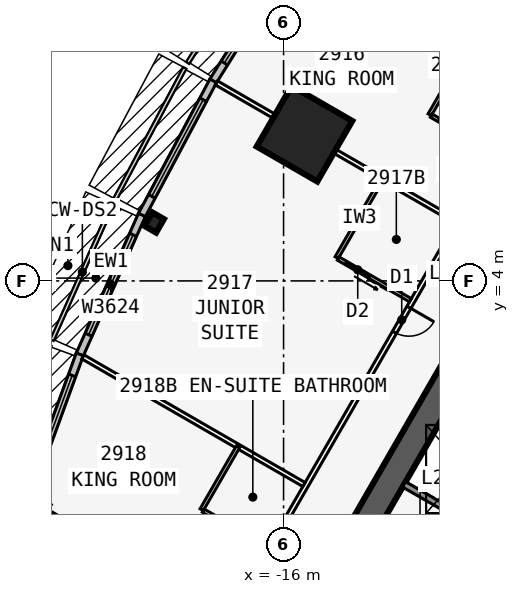
"""IFC4 building model, lengths in metres.
Left out: names, types, materials, properties, quantities, classifications, styles, units other than length and angle.
Written with IfcOpenShell. Run it as: python <this file> out.ifc"""

import sys

from ifc_helpers import new_model, si_unit, direction, frame, frame_2d, origin, origin_2d, place, context, subcontext, project, spatial, rectangle, i_section, extrude, element, fill, save


model = new_model("IFC4")
c1 = context("Model", 3, precision=1e-05, world=origin(), true_north=direction((0.0, 1.0)))
c2 = subcontext(c1, "Body", "Model", "MODEL_VIEW")
j1 = project(units=[si_unit("LENGTHUNIT", "METRE"), si_unit("PLANEANGLEUNIT", "RADIAN")], contexts=[c1])
p1 = place(None, origin())
s1 = spatial("IfcSite", under=j1, at=p1, CompositionType="ELEMENT")
p2 = place(p1, origin())
s2 = spatial("IfcBuilding", under=s1, at=p2, CompositionType="ELEMENT")
p3 = place(p2, frame((0.0, 0.0, 114.7)))
s3 = spatial("IfcBuildingStorey", under=s2, at=p3, CompositionType="ELEMENT", Elevation=114.7)
p4 = place(p3, frame((0.0, 19.052, 0.0), z_axis=(0.0, 0.0, 1.0), x_axis=(-0.499999749417, -0.866025548458, 0.0)))
e1 = element("IfcWall", 1, at=p4, inside=s3, PredefinedType="SHEAR", context=c2, shape_type="SweptSolid", body=[
    extrude(rectangle(XDim=33.0, YDim=0.9, at=frame_2d((16.5, 0.0))), origin(), (0.0, 0.0, 1.0), 3.4),
])
p5 = place(p4, frame((14.15, 0.0, 0.0)))
e2 = element("IfcOpeningElement", 2, at=p5, cuts=e1, PredefinedType="OPENING", context=c2, shape_type="SweptSolid", body=[
    extrude(rectangle(XDim=1.8, YDim=2.13, at=frame_2d((0.9, 1.065))), frame((0.0, 0.46, 0.0), z_axis=(0.0, -1.0, 0.0), x_axis=(1.0, 0.0, 0.0)), (0.0, 0.0, 1.0), 0.92),
])
p6 = place(p4, frame((12.6, 0.0, 0.0)))
e3 = element("IfcOpeningElement", 3, at=p6, cuts=e1, PredefinedType="OPENING", context=c2, shape_type="SweptSolid", body=[
    extrude(rectangle(XDim=1.0, YDim=2.13, at=frame_2d((0.5, 1.065))), frame((0.0, 0.46, 0.0), z_axis=(0.0, -1.0, 0.0), x_axis=(1.0, 0.0, 0.0)), (0.0, 0.0, 1.0), 0.92),
])
p7 = place(p3, frame((-9.329, -4.256, 0.0), z_axis=(0.0, 0.0, 1.0), x_axis=(-0.866022959057, 0.500004234368, 0.0)))
e4 = element("IfcWall", 4, at=p7, inside=s3, PredefinedType="SOLIDWALL", context=c2, shape_type="SweptSolid", body=[
    extrude(rectangle(XDim=3.125, YDim=0.2, at=frame_2d((1.562, 0.0))), origin(), (0.0, 0.0, 1.0), 3.235),
])
p8 = place(p3, frame((-20.254, 5.92, 0.0), z_axis=(0.0, 0.0, 1.0), x_axis=(-0.866025403784, 0.5, 0.0)))
e5 = element("IfcColumn", 5, at=p8, inside=s3, PredefinedType="COLUMN", context=c2, shape_type="SweptSolid", body=[
    extrude(i_section(OverallWidth=0.437, OverallDepth=0.513, WebThickness=0.061, FlangeThickness=0.097, at=origin_2d()), origin(), (0.0, 0.0, 1.0), 3.4),
])
p9 = place(p3, frame((-15.312, 8.84, 0.0), z_axis=(0.0, 0.0, 1.0), x_axis=(-0.866025403784, 0.5, 0.0)))
e6 = element("IfcColumn", 6, at=p9, inside=s3, PredefinedType="COLUMN", context=c2, shape_type="SweptSolid", body=[
    extrude(rectangle(XDim=2.3, YDim=2.3, at=origin_2d()), origin(), (0.0, 0.0, 1.0), 3.4),
])
p10 = place(p3, frame((-15.667, 14.814, 0.0), z_axis=(0.0, 0.0, 1.0), x_axis=(-0.529990167382, -0.84800378683, 0.0)))
e7 = element("IfcWall", 7, at=p10, inside=s3, PredefinedType="STANDARD", context=c2, shape_type="SweptSolid", body=[
    extrude(rectangle(XDim=5.003, YDim=0.25, at=frame_2d((2.501, 0.0))), origin(), (0.0, 0.0, 1.0), 3.235),
])
p11 = place(p10, frame((0.701, 0.0, 0.45)))
e8 = element("IfcOpeningElement", 8, at=p11, cuts=e7, PredefinedType="OPENING", context=c2, shape_type="SweptSolid", body=[
    extrude(rectangle(XDim=3.6, YDim=2.4, at=frame_2d((1.8, 1.2))), frame((0.0, 0.135, 0.0), z_axis=(0.0, -1.0, 0.0), x_axis=(1.0, 0.0, 0.0)), (0.0, 0.0, 1.0), 0.27),
])
p12 = place(p3, frame((-18.314, 10.579, 0.0), z_axis=(0.0, 0.0, 1.0), x_axis=(-0.469404966864, -0.882982999317, 0.0)))
e9 = element("IfcWall", 9, at=p12, inside=s3, PredefinedType="STANDARD", context=c2, shape_type="SweptSolid", body=[
    extrude(rectangle(XDim=5.003, YDim=0.25, at=frame_2d((2.501, 0.0))), origin(), (0.0, 0.0, 1.0), 3.235),
])
p13 = place(p12, frame((0.701, 0.0, 0.45)))
e10 = element("IfcOpeningElement", 10, at=p13, cuts=e9, PredefinedType="OPENING", context=c2, shape_type="SweptSolid", body=[
    extrude(rectangle(XDim=3.6, YDim=2.4, at=frame_2d((1.8, 1.2))), frame((0.0, 0.135, 0.0), z_axis=(0.0, -1.0, 0.0), x_axis=(1.0, 0.0, 0.0)), (0.0, 0.0, 1.0), 0.27),
])
p14 = place(p3, frame((-20.659, 6.169, 0.0), z_axis=(0.0, 0.0, 1.0), x_axis=(-0.406832200364, -0.913502906808, 0.0)))
e11 = element("IfcWall", 11, at=p14, inside=s3, PredefinedType="STANDARD", context=c2, shape_type="SweptSolid", body=[
    extrude(rectangle(XDim=5.028, YDim=0.25, at=frame_2d((2.514, 0.0))), origin(), (0.0, 0.0, 1.0), 3.235),
])
p15 = place(p14, frame((0.714, 0.0, 0.45)))
e12 = element("IfcOpeningElement", 12, at=p15, cuts=e11, PredefinedType="OPENING", context=c2, shape_type="SweptSolid", body=[
    extrude(rectangle(XDim=3.6, YDim=2.4, at=frame_2d((1.8, 1.2))), frame((0.0, 0.135, 0.0), z_axis=(0.0, -1.0, 0.0), x_axis=(1.0, 0.0, 0.0)), (0.0, 0.0, 1.0), 0.27),
])
p16 = place(p3, frame((-22.701, 1.584, 0.0), z_axis=(0.0, 0.0, 1.0), x_axis=(-0.343225593282, -0.939252996863, 0.0)))
e13 = element("IfcWall", 13, at=p16, inside=s3, PredefinedType="STANDARD", context=c2, shape_type="SweptSolid", body=[
    extrude(rectangle(XDim=5.076, YDim=0.25, at=frame_2d((2.538, 0.0))), origin(), (0.0, 0.0, 1.0), 3.235),
])
p17 = place(p16, frame((0.738, 0.0, 0.45)))
e14 = element("IfcOpeningElement", 14, at=p17, cuts=e13, PredefinedType="OPENING", context=c2, shape_type="SweptSolid", body=[
    extrude(rectangle(XDim=3.6, YDim=2.4, at=frame_2d((1.8, 1.2))), frame((0.0, 0.135, 0.0), z_axis=(0.0, -1.0, 0.0), x_axis=(1.0, 0.0, 0.0)), (0.0, 0.0, 1.0), 0.27),
])
p18 = place(p3, frame((-0.5, 22.836, 0.0), z_axis=(0.0, 0.0, 1.0), x_axis=(-0.500001677587, -0.866024435227, 0.0)))
e15 = element("IfcWall", 15, at=p18, inside=s3, PredefinedType="PARTITIONING", context=c2, shape_type="SweptSolid", body=[
    extrude(rectangle(XDim=39.054, YDim=0.15, at=frame_2d((19.527, 0.0))), origin(), (0.0, 0.0, 1.0), 3.235),
])
p19 = place(p18, frame((0.352, 0.0, 0.0)))
e16 = element("IfcOpeningElement", 16, at=p19, cuts=e15, PredefinedType="OPENING", context=c2, shape_type="SweptSolid", body=[
    extrude(rectangle(XDim=0.95, YDim=2.13, at=frame_2d((0.475, 1.065))), frame((0.0, 0.085, 0.0), z_axis=(0.0, -1.0, 0.0), x_axis=(1.0, 0.0, 0.0)), (0.0, 0.0, 1.0), 0.17),
])
p20 = place(p18, frame((7.152, 0.0, 0.0)))
e17 = element("IfcOpeningElement", 17, at=p20, cuts=e15, PredefinedType="OPENING", context=c2, shape_type="SweptSolid", body=[
    extrude(rectangle(XDim=0.95, YDim=2.13, at=frame_2d((0.475, 1.065))), frame((0.0, 0.085, 0.0), z_axis=(0.0, -1.0, 0.0), x_axis=(1.0, 0.0, 0.0)), (0.0, 0.0, 1.0), 0.17),
])
p21 = place(p18, frame((12.152, 0.0, 0.0)))
e18 = element("IfcOpeningElement", 18, at=p21, cuts=e15, PredefinedType="OPENING", context=c2, shape_type="SweptSolid", body=[
    extrude(rectangle(XDim=0.95, YDim=2.13, at=frame_2d((0.475, 1.065))), frame((0.0, 0.085, 0.0), z_axis=(0.0, -1.0, 0.0), x_axis=(1.0, 0.0, 0.0)), (0.0, 0.0, 1.0), 0.17),
])
p22 = place(p18, frame((17.152, 0.0, 0.0)))
e19 = element("IfcOpeningElement", 19, at=p22, cuts=e15, PredefinedType="OPENING", context=c2, shape_type="SweptSolid", body=[
    extrude(rectangle(XDim=0.95, YDim=2.13, at=frame_2d((0.475, 1.065))), frame((0.0, 0.085, 0.0), z_axis=(0.0, -1.0, 0.0), x_axis=(1.0, 0.0, 0.0)), (0.0, 0.0, 1.0), 0.17),
])
p23 = place(p18, frame((22.752, 0.0, 0.0)))
e20 = element("IfcOpeningElement", 20, at=p23, cuts=e15, PredefinedType="OPENING", context=c2, shape_type="SweptSolid", body=[
    extrude(rectangle(XDim=0.95, YDim=2.13, at=frame_2d((0.475, 1.065))), frame((0.0, 0.085, 0.0), z_axis=(0.0, -1.0, 0.0), x_axis=(1.0, 0.0, 0.0)), (0.0, 0.0, 1.0), 0.17),
])
p24 = place(p18, frame((32.152, 0.0, 0.0)))
e21 = element("IfcOpeningElement", 21, at=p24, cuts=e15, PredefinedType="OPENING", context=c2, shape_type="SweptSolid", body=[
    extrude(rectangle(XDim=0.95, YDim=2.13, at=frame_2d((0.475, 1.065))), frame((0.0, 0.085, 0.0), z_axis=(0.0, -1.0, 0.0), x_axis=(1.0, 0.0, 0.0)), (0.0, 0.0, 1.0), 0.17),
])
p25 = place(p18, frame((37.752, 0.0, 0.0)))
e22 = element("IfcOpeningElement", 22, at=p25, cuts=e15, PredefinedType="OPENING", context=c2, shape_type="SweptSolid", body=[
    extrude(rectangle(XDim=0.95, YDim=2.13, at=frame_2d((0.475, 1.065))), frame((0.0, 0.085, 0.0), z_axis=(0.0, -1.0, 0.0), x_axis=(1.0, 0.0, 0.0)), (0.0, 0.0, 1.0), 0.17),
])
p26 = place(p3, frame((-7.829, 10.293, 0.0), z_axis=(0.0, 0.0, 1.0), x_axis=(-0.866027015393, 0.499997208602, 0.0)))
e23 = element("IfcWall", 23, at=p26, inside=s3, PredefinedType="PARTITIONING", context=c2, shape_type="SweptSolid", body=[
    extrude(rectangle(XDim=8.922, YDim=0.15, at=frame_2d((4.461, 0.0))), origin(), (0.0, 0.0, 1.0), 2.389),
])
p27 = place(p3, frame((-10.329, 5.963, 0.0), z_axis=(0.0, 0.0, 1.0), x_axis=(-0.866025170687, 0.500000403736, 0.0)))
e24 = element("IfcWall", 24, at=p27, inside=s3, PredefinedType="PARTITIONING", context=c2, shape_type="SweptSolid", body=[
    extrude(rectangle(XDim=9.099, YDim=0.15, at=frame_2d((4.549, 0.0))), origin(), (0.0, 0.0, 1.0), 2.389),
])
p28 = place(p3, frame((-15.329, -2.697, 0.0), z_axis=(0.0, 0.0, 1.0), x_axis=(-0.866024316602, 0.50000188305, 0.0)))
e25 = element("IfcWall", 25, at=p28, inside=s3, PredefinedType="PARTITIONING", context=c2, shape_type="SweptSolid", body=[
    extrude(rectangle(XDim=8.395, YDim=0.15, at=frame_2d((4.198, 0.0))), origin(), (0.0, 0.0, 1.0), 2.389),
])
p29 = place(p3, frame((-17.829, -7.027, 0.0), z_axis=(0.0, 0.0, 1.0), x_axis=(-0.866029804378, 0.499992377871, 0.0)))
e26 = element("IfcWall", 26, at=p29, inside=s3, PredefinedType="PARTITIONING", context=c2, shape_type="SweptSolid", body=[
    extrude(rectangle(XDim=7.516, YDim=0.15, at=frame_2d((3.758, 0.0))), origin(), (0.0, 0.0, 1.0), 2.389),
])
p30 = place(p3, frame((-9.993, 11.543, 0.0), z_axis=(0.0, 0.0, 1.0), x_axis=(-0.500077600433, -0.865980596518, 0.0)))
e27 = element("IfcWall", 27, at=p30, inside=s3, PredefinedType="PLUMBINGWALL", context=c2, shape_type="SweptSolid", body=[
    extrude(rectangle(XDim=2.4, YDim=0.12, at=frame_2d((1.2, 0.0))), origin(), (0.0, 0.0, 1.0), 3.235),
])
p31 = place(p3, frame((-9.029, 8.215, 0.0), z_axis=(0.0, 0.0, 1.0), x_axis=(-0.866023955769, 0.500002508028, 0.0)))
e28 = element("IfcWall", 28, at=p31, inside=s3, PredefinedType="PLUMBINGWALL", context=c2, shape_type="SweptSolid", body=[
    extrude(rectangle(XDim=2.44, YDim=0.12, at=frame_2d((1.22, 0.0))), origin(), (0.0, 0.0, 1.0), 3.235),
])
p32 = place(p31, frame((1.25, 0.0, 0.0)))
e29 = element("IfcOpeningElement", 29, at=p32, cuts=e28, PredefinedType="OPENING", context=c2, shape_type="SweptSolid", body=[
    extrude(rectangle(XDim=0.9, YDim=2.13, at=frame_2d((0.45, 1.065))), frame((0.0, 0.07, 0.0), z_axis=(0.0, -1.0, 0.0), x_axis=(1.0, 0.0, 0.0)), (0.0, 0.0, 1.0), 0.14),
])
p33 = place(p3, frame((-12.753, 7.363, 0.0), z_axis=(0.0, 0.0, 1.0), x_axis=(-0.50002537861, -0.866010750942, 0.0)))
e30 = element("IfcWall", 30, at=p33, inside=s3, PredefinedType="PLUMBINGWALL", context=c2, shape_type="SweptSolid", body=[
    extrude(rectangle(XDim=3.0, YDim=0.12, at=frame_2d((1.5, 0.0))), origin(), (0.0, 0.0, 1.0), 3.235),
])
p34 = place(p3, frame((-11.829, 3.365, 0.0), z_axis=(0.0, 0.0, 1.0), x_axis=(-0.865997131366, 0.500048966069, 0.0)))
e31 = element("IfcWall", 31, at=p34, inside=s3, PredefinedType="PLUMBINGWALL", context=c2, shape_type="SweptSolid", body=[
    extrude(rectangle(XDim=2.74, YDim=0.12, at=frame_2d((1.37, 0.0))), origin(), (0.0, 0.0, 1.0), 3.235),
])
p35 = place(p34, frame((1.55, 0.0, 0.0)))
e32 = element("IfcOpeningElement", 32, at=p35, cuts=e31, PredefinedType="OPENING", context=c2, shape_type="SweptSolid", body=[
    extrude(rectangle(XDim=0.9, YDim=2.13, at=frame_2d((0.45, 1.065))), frame((0.0, 0.07, 0.0), z_axis=(0.0, -1.0, 0.0), x_axis=(1.0, 0.0, 0.0)), (0.0, 0.0, 1.0), 0.14),
])
p36 = place(p3, frame((-17.493, -1.447, 0.0), z_axis=(0.0, 0.0, 1.0), x_axis=(-0.500033551112, -0.866006032174, 0.0)))
e33 = element("IfcWall", 33, at=p36, inside=s3, PredefinedType="PLUMBINGWALL", context=c2, shape_type="SweptSolid", body=[
    extrude(rectangle(XDim=2.4, YDim=0.12, at=frame_2d((1.2, 0.0))), origin(), (0.0, 0.0, 1.0), 3.235),
])
p37 = place(p3, frame((-16.529, -4.776, 0.0), z_axis=(0.0, 0.0, 1.0), x_axis=(-0.866023955769, 0.500002508028, 0.0)))
e34 = element("IfcWall", 34, at=p37, inside=s3, PredefinedType="PLUMBINGWALL", context=c2, shape_type="SweptSolid", body=[
    extrude(rectangle(XDim=2.44, YDim=0.12, at=frame_2d((1.22, 0.0))), origin(), (0.0, 0.0, 1.0), 3.235),
])
p38 = place(p37, frame((1.25, 0.0, 0.0)))
e35 = element("IfcOpeningElement", 35, at=p38, cuts=e34, PredefinedType="OPENING", context=c2, shape_type="SweptSolid", body=[
    extrude(rectangle(XDim=0.9, YDim=2.13, at=frame_2d((0.45, 1.065))), frame((0.0, 0.07, 0.0), z_axis=(0.0, -1.0, 0.0), x_axis=(1.0, 0.0, 0.0)), (0.0, 0.0, 1.0), 0.14),
])
p39 = place(p11, origin())
e36 = element("IfcWindow", 36, at=p39, inside=s3, PartitioningType="SINGLE_PANEL", PredefinedType="WINDOW", context=c2, shape_type="SweptSolid", body=[
    extrude(rectangle(XDim=3.6, YDim=2.4, at=frame_2d((1.8, 1.2))), frame((0.0, 0.03, 0.0), z_axis=(0.0, -1.0, 0.0), x_axis=(1.0, 0.0, 0.0)), (0.0, 0.0, 1.0), 0.06),
])
fill(e8, e36)
p40 = place(p13, origin())
e37 = element("IfcWindow", 37, at=p40, inside=s3, PartitioningType="SINGLE_PANEL", PredefinedType="WINDOW", context=c2, shape_type="SweptSolid", body=[
    extrude(rectangle(XDim=3.6, YDim=2.4, at=frame_2d((1.8, 1.2))), frame((0.0, 0.03, 0.0), z_axis=(0.0, -1.0, 0.0), x_axis=(1.0, 0.0, 0.0)), (0.0, 0.0, 1.0), 0.06),
])
fill(e10, e37)
p41 = place(p15, origin())
e38 = element("IfcWindow", 38, at=p41, inside=s3, PartitioningType="SINGLE_PANEL", PredefinedType="WINDOW", context=c2, shape_type="SweptSolid", body=[
    extrude(rectangle(XDim=3.6, YDim=2.4, at=frame_2d((1.8, 1.2))), frame((0.0, 0.03, 0.0), z_axis=(0.0, -1.0, 0.0), x_axis=(1.0, 0.0, 0.0)), (0.0, 0.0, 1.0), 0.06),
])
fill(e12, e38)
p42 = place(p17, origin())
e39 = element("IfcWindow", 39, at=p42, inside=s3, PartitioningType="SINGLE_PANEL", PredefinedType="WINDOW", context=c2, shape_type="SweptSolid", body=[
    extrude(rectangle(XDim=3.6, YDim=2.4, at=frame_2d((1.8, 1.2))), frame((0.0, 0.03, 0.0), z_axis=(0.0, -1.0, 0.0), x_axis=(1.0, 0.0, 0.0)), (0.0, 0.0, 1.0), 0.06),
])
fill(e14, e39)
p43 = place(p32, origin())
e40 = element("IfcDoor", 40, at=p43, inside=s3, OperationType="SLIDING_TO_LEFT", PredefinedType="DOOR", context=c2, shape_type="SweptSolid", body=[
    extrude(rectangle(XDim=0.9, YDim=2.13, at=frame_2d((0.45, 1.065))), frame((0.0, 0.025, 0.0), z_axis=(0.0, -1.0, 0.0), x_axis=(1.0, 0.0, 0.0)), (0.0, 0.0, 1.0), 0.05),
])
fill(e29, e40)
p44 = place(p35, origin())
e41 = element("IfcDoor", 41, at=p44, inside=s3, OperationType="SLIDING_TO_LEFT", PredefinedType="DOOR", context=c2, shape_type="SweptSolid", body=[
    extrude(rectangle(XDim=0.9, YDim=2.13, at=frame_2d((0.45, 1.065))), frame((0.0, 0.025, 0.0), z_axis=(0.0, -1.0, 0.0), x_axis=(1.0, 0.0, 0.0)), (0.0, 0.0, 1.0), 0.05),
])
fill(e32, e41)
p45 = place(p23, origin())
e42 = element("IfcDoor", 42, at=p45, inside=s3, OperationType="SINGLE_SWING_LEFT", PredefinedType="DOOR", context=c2, shape_type="SweptSolid", body=[
    extrude(rectangle(XDim=0.95, YDim=2.13, at=frame_2d((0.475, 1.065))), frame((0.0, 0.025, 0.0), z_axis=(0.0, -1.0, 0.0), x_axis=(1.0, 0.0, 0.0)), (0.0, 0.0, 1.0), 0.05),
])
fill(e20, e42)
p46 = place(p38, origin())
e43 = element("IfcDoor", 43, at=p46, inside=s3, OperationType="SLIDING_TO_LEFT", PredefinedType="DOOR", context=c2, shape_type="SweptSolid", body=[
    extrude(rectangle(XDim=0.9, YDim=2.13, at=frame_2d((0.45, 1.065))), frame((0.0, 0.025, 0.0), z_axis=(0.0, -1.0, 0.0), x_axis=(1.0, 0.0, 0.0)), (0.0, 0.0, 1.0), 0.05),
])
fill(e35, e43)
save(model, sys.argv[1])
